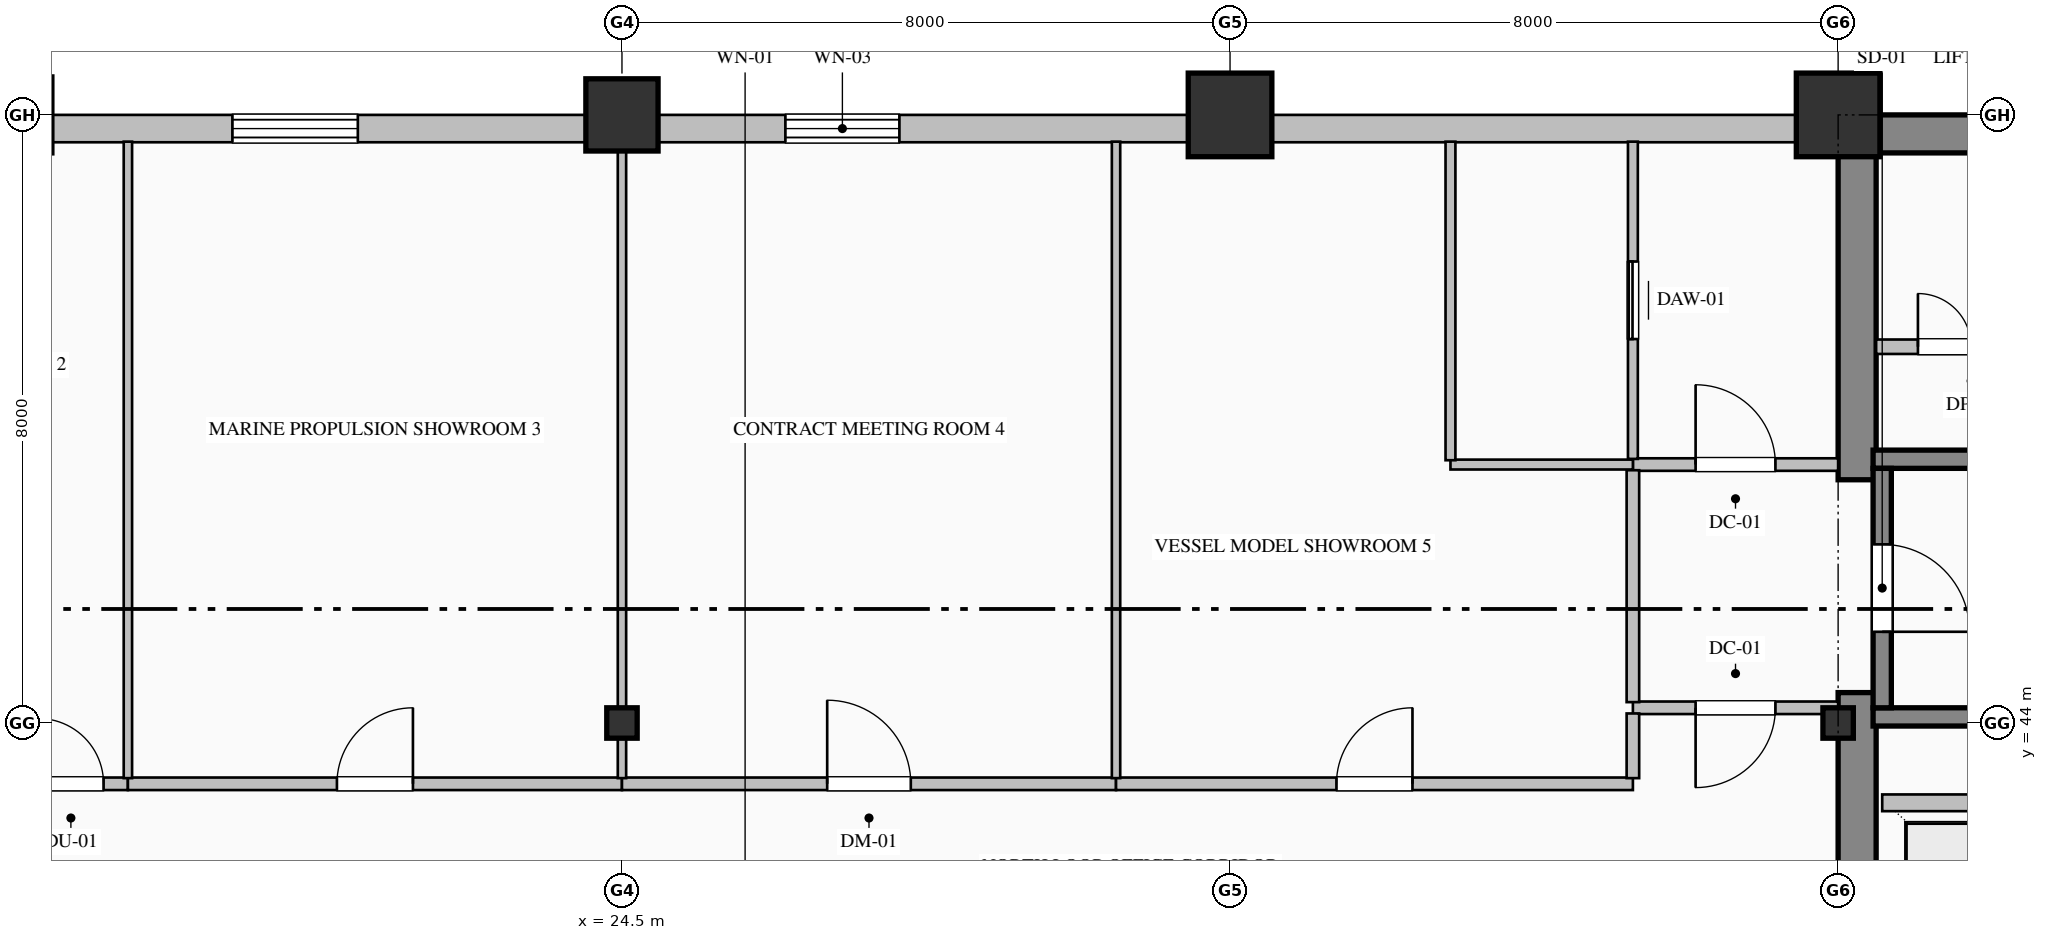
"""IFC4 building model, lengths in metres.
Left out: names, types, materials, properties, quantities, classifications, styles, units other than length and angle.
Written with IfcOpenShell. Run it as: python <this file> out.ifc"""

import sys

from ifc_helpers import new_model, si_unit, direction, frame, frame_2d, origin, origin_2d, place, context, subcontext, project, spatial, rectangle, hollow_rectangle, i_section, extrude, element, fill, save


model = new_model("IFC4")
c1 = context("Model", 3, precision=1e-05, world=origin(), true_north=direction((0.0, 1.0)))
c2 = subcontext(c1, "Body", "Model", "MODEL_VIEW")
j1 = project(units=[si_unit("LENGTHUNIT", "METRE"), si_unit("PLANEANGLEUNIT", "RADIAN")], contexts=[c1])
p1 = place(None, origin())
s1 = spatial("IfcSite", under=j1, at=p1, CompositionType="ELEMENT")
p2 = place(p1, origin())
s2 = spatial("IfcBuilding", under=s1, at=p2, CompositionType="ELEMENT")
p3 = place(p2, frame((0.0, 0.0, 179.0)))
s3 = spatial("IfcBuildingStorey", under=s2, at=p3, CompositionType="ELEMENT", Elevation=179.0)
p4 = place(p3, frame((40.5, 51.75, 0.0), z_axis=(0.0, 0.0, 1.0), x_axis=(1.0, 0.0, 0.0)))
e1 = element("IfcWall", 1, at=p4, inside=s3, PredefinedType="SHEAR", context=c2, shape_type="SweptSolid", body=[
    extrude(rectangle(XDim=23.5, YDim=0.5, at=frame_2d((11.75, 0.0))), origin(), (0.0, 0.0, 1.0), 3.765),
])
p5 = place(p3, frame((40.75, 36.5, 0.0), z_axis=(0.0, 0.0, 1.0), x_axis=(0.0, 1.0, 0.0)))
e2 = element("IfcWall", 2, at=p5, inside=s3, PredefinedType="SHEAR", context=c2, shape_type="SweptSolid", body=[
    extrude(rectangle(XDim=7.9, YDim=0.5, at=frame_2d((3.95, 0.0))), origin(), (0.0, 0.0, 1.0), 3.765),
])
p6 = place(p3, frame((40.75, 47.2, 0.0), z_axis=(0.0, 0.0, 1.0), x_axis=(0.0, 1.0, 0.0)))
e3 = element("IfcWall", 3, at=p6, inside=s3, PredefinedType="SHEAR", context=c2, shape_type="SweptSolid", body=[
    extrude(rectangle(XDim=4.3, YDim=0.5, at=frame_2d((2.15, 0.0))), origin(), (0.0, 0.0, 1.0), 3.765),
])
p7 = place(p3, frame((24.5, 44.0, 0.0), z_axis=(0.0, 0.0, 1.0), x_axis=(1.0, 0.0, 0.0)))
e4 = element("IfcColumn", 4, at=p7, inside=s3, PredefinedType="COLUMN", context=c2, shape_type="SweptSolid", body=[
    extrude(i_section(OverallWidth=0.4, OverallDepth=0.4, WebThickness=0.013, FlangeThickness=0.021, FilletRadius=0.022, at=origin_2d()), origin(), (0.0, 0.0, 1.0), 4.0),
])
p8 = place(p3, frame((24.5, 52.0, 0.0), z_axis=(0.0, 0.0, 1.0), x_axis=(1.0, 0.0, 0.0)))
e5 = element("IfcColumn", 5, at=p8, inside=s3, PredefinedType="COLUMN", context=c2, shape_type="SweptSolid", body=[
    extrude(hollow_rectangle(XDim=0.95, YDim=0.95, WallThickness=0.036, at=origin_2d()), origin(), (0.0, 0.0, 1.0), 4.0),
])
p9 = place(p3, frame((32.5, 52.0, 0.0), z_axis=(0.0, 0.0, 1.0), x_axis=(1.0, 0.0, 0.0)))
e6 = element("IfcColumn", 6, at=p9, inside=s3, PredefinedType="COLUMN", context=c2, shape_type="SweptSolid", body=[
    extrude(hollow_rectangle(XDim=1.1, YDim=1.1, WallThickness=0.04, at=origin_2d()), origin(), (0.0, 0.0, 1.0), 4.0),
])
p10 = place(p3, frame((40.5, 44.0, 0.0), z_axis=(0.0, 0.0, 1.0), x_axis=(1.0, 0.0, 0.0)))
e7 = element("IfcColumn", 7, at=p10, inside=s3, PredefinedType="COLUMN", context=c2, shape_type="SweptSolid", body=[
    extrude(i_section(OverallWidth=0.4, OverallDepth=0.4, WebThickness=0.013, FlangeThickness=0.021, FilletRadius=0.022, at=origin_2d()), origin(), (0.0, 0.0, 1.0), 4.0),
])
p11 = place(p3, frame((40.5, 52.0, 0.0), z_axis=(0.0, 0.0, 1.0), x_axis=(1.0, 0.0, 0.0)))
e8 = element("IfcColumn", 8, at=p11, inside=s3, PredefinedType="COLUMN", context=c2, shape_type="SweptSolid", body=[
    extrude(hollow_rectangle(XDim=1.1, YDim=1.1, WallThickness=0.04, at=origin_2d()), origin(), (0.0, 0.0, 1.0), 4.0),
])
p12 = place(p3, frame((13.0, 51.82, 0.0), z_axis=(0.0, 0.0, 1.0), x_axis=(1.0, 0.0, 0.0)))
e9 = element("IfcWall", 9, at=p12, inside=s3, PredefinedType="SOLIDWALL", context=c2, shape_type="SweptSolid", body=[
    extrude(rectangle(XDim=27.52, YDim=0.36, at=frame_2d((13.76, 0.0))), origin(), (0.0, 0.0, 1.0), 3.265),
])
p13 = place(p12, frame((6.375, 0.0, 0.85)))
e10 = element("IfcOpeningElement", 10, at=p13, cuts=e9, PredefinedType="OPENING", context=c2, shape_type="SweptSolid", body=[
    extrude(rectangle(XDim=1.65, YDim=1.95, at=frame_2d((0.825, 0.975))), frame((0.0, 0.19, 0.0), z_axis=(0.0, -1.0, 0.0), x_axis=(1.0, 0.0, 0.0)), (0.0, 0.0, 1.0), 0.38),
])
p14 = place(p12, frame((13.65, 0.0, 0.85)))
e11 = element("IfcOpeningElement", 11, at=p14, cuts=e9, PredefinedType="OPENING", context=c2, shape_type="SweptSolid", body=[
    extrude(rectangle(XDim=1.5, YDim=1.95, at=frame_2d((0.75, 0.975))), frame((0.0, 0.19, 0.0), z_axis=(0.0, -1.0, 0.0), x_axis=(1.0, 0.0, 0.0)), (0.0, 0.0, 1.0), 0.38),
])
for number, where, z_axis, x_axis in (
    (12, (40.96, 47.47, 0.0), (0.0, 0.0, 1.0), (1.0, 0.0, 0.0)),
    (13, (49.04, 44.08, 0.0), (0.0, 0.0, 1.0), (-1.0, 0.0, 0.0)),
):
    element("IfcWall", number, at=place(p3, frame(where, z_axis=z_axis, x_axis=x_axis)), inside=s3, PredefinedType="SOLIDWALL", context=c2, shape_type="SweptSolid", body=[
        extrude(rectangle(XDim=8.08, YDim=0.24, at=frame_2d((4.04, 0.0))), origin(), (0.0, 0.0, 1.0), 4.0),
    ])
p15 = place(p3, frame((41.08, 47.35, 0.0), z_axis=(0.0, 0.0, 1.0), x_axis=(0.0, -1.0, 0.0)))
e14 = element("IfcWall", 14, at=p15, inside=s3, PredefinedType="SOLIDWALL", context=c2, shape_type="SweptSolid", body=[
    extrude(rectangle(XDim=3.15, YDim=0.24, at=frame_2d((1.575, 0.0))), origin(), (0.0, 0.0, 1.0), 4.0),
])
p16 = place(p15, frame((1.0, 0.0, 0.0)))
e15 = element("IfcOpeningElement", 15, at=p16, cuts=e14, PredefinedType="OPENING", context=c2, shape_type="SweptSolid", body=[
    extrude(rectangle(XDim=1.15, YDim=2.2, at=frame_2d((0.575, 1.1))), frame((0.0, 0.13, 0.0), z_axis=(0.0, -1.0, 0.0), x_axis=(1.0, 0.0, 0.0)), (0.0, 0.0, 1.0), 0.26),
])
p17 = place(p3, frame((41.08, 42.95, 0.0), z_axis=(0.0, 0.0, 1.0), x_axis=(1.0, 0.0, 0.0)))
e16 = element("IfcWall", 16, at=p17, inside=s3, PredefinedType="PARTITIONING", context=c2, shape_type="SweptSolid", body=[
    extrude(rectangle(XDim=8.24, YDim=0.22, at=frame_2d((4.12, 0.0))), origin(), (0.0, 0.0, 1.0), 3.765),
])
p18 = place(p3, frame((37.8, 47.4, 0.0), z_axis=(0.0, 0.0, 1.0), x_axis=(1.0, 0.0, 0.0)))
e17 = element("IfcWall", 17, at=p18, inside=s3, PredefinedType="PARTITIONING", context=c2, shape_type="SweptSolid", body=[
    extrude(rectangle(XDim=2.7, YDim=0.165, at=frame_2d((1.35, 0.0))), origin(), (0.0, 0.0, 1.0), 3.765),
])
p19 = place(p18, frame((0.825, 0.0, 0.0)))
e18 = element("IfcOpeningElement", 18, at=p19, cuts=e17, PredefinedType="OPENING", context=c2, shape_type="SweptSolid", body=[
    extrude(rectangle(XDim=1.05, YDim=2.15, at=frame_2d((0.525, 1.075))), frame((0.0, 0.093, 0.0), z_axis=(0.0, -1.0, 0.0), x_axis=(1.0, 0.0, 0.0)), (0.0, 0.0, 1.0), 0.185),
])
p20 = place(p3, frame((40.5, 44.2, 0.0), z_axis=(0.0, 0.0, 1.0), x_axis=(-1.0, 0.0, 0.0)))
e19 = element("IfcWall", 19, at=p20, inside=s3, PredefinedType="PARTITIONING", context=c2, shape_type="SweptSolid", body=[
    extrude(rectangle(XDim=2.7, YDim=0.165, at=frame_2d((1.35, 0.0))), origin(), (0.0, 0.0, 1.0), 3.765),
])
p21 = place(p20, frame((0.825, 0.0, 0.0)))
e20 = element("IfcOpeningElement", 20, at=p21, cuts=e19, PredefinedType="OPENING", context=c2, shape_type="SweptSolid", body=[
    extrude(rectangle(XDim=1.05, YDim=2.15, at=frame_2d((0.525, 1.075))), frame((0.0, 0.093, 0.0), z_axis=(0.0, -1.0, 0.0), x_axis=(1.0, 0.0, 0.0)), (0.0, 0.0, 1.0), 0.185),
])
p22 = place(p3, frame((37.8, 44.274, 0.0), z_axis=(0.0, 0.0, 1.0), x_axis=(0.0, 1.0, 0.0)))
e21 = element("IfcWall", 21, at=p22, inside=s3, PredefinedType="PARTITIONING", context=c2, shape_type="SweptSolid", body=[
    extrude(rectangle(XDim=3.051, YDim=0.165, at=frame_2d((1.525, 0.0))), origin(), (0.0, 0.0, 1.0), 3.765),
])
p23 = place(p3, frame((37.8, 47.475, 0.0), z_axis=(0.0, 0.0, 1.0), x_axis=(0.0, 1.0, 0.0)))
e22 = element("IfcWall", 22, at=p23, inside=s3, PredefinedType="PARTITIONING", context=c2, shape_type="SweptSolid", body=[
    extrude(rectangle(XDim=4.173, YDim=0.13, at=frame_2d((2.087, 0.0))), origin(), (0.0, 0.0, 1.0), 3.765),
])
p24 = place(p23, frame((1.577, 0.0, 0.0)))
e23 = element("IfcOpeningElement", 23, at=p24, cuts=e22, PredefinedType="OPENING", context=c2, shape_type="SweptSolid", body=[
    extrude(rectangle(XDim=1.02, YDim=2.15, at=frame_2d((0.51, 1.075))), frame((0.0, 0.075, 0.0), z_axis=(0.0, -1.0, 0.0), x_axis=(1.0, 0.0, 0.0)), (0.0, 0.0, 1.0), 0.15),
])
p25 = place(p3, frame((37.8, 47.4, 0.0), z_axis=(0.0, 0.0, 1.0), x_axis=(-1.0, 0.0, 0.0)))
e24 = element("IfcWall", 24, at=p25, inside=s3, PredefinedType="PARTITIONING", context=c2, shape_type="SweptSolid", body=[
    extrude(rectangle(XDim=2.4, YDim=0.13, at=frame_2d((1.2, 0.0))), origin(), (0.0, 0.0, 1.0), 3.765),
])
p26 = place(p3, frame((35.4, 47.457, 0.0), z_axis=(0.0, 0.0, 1.0), x_axis=(0.0, 1.0, 0.0)))
e25 = element("IfcWall", 25, at=p26, inside=s3, PredefinedType="PARTITIONING", context=c2, shape_type="SweptSolid", body=[
    extrude(rectangle(XDim=4.191, YDim=0.13, at=frame_2d((2.095, 0.0))), origin(), (0.0, 0.0, 1.0), 3.765),
])
p27 = place(p3, frame((41.0, 48.95, 0.0), z_axis=(0.0, 0.0, 1.0), x_axis=(1.0, 0.0, 0.0)))
e26 = element("IfcWall", 26, at=p27, inside=s3, PredefinedType="PARTITIONING", context=c2, shape_type="SweptSolid", body=[
    extrude(rectangle(XDim=2.5, YDim=0.19, at=frame_2d((1.25, 0.0))), origin(), (0.0, 0.0, 1.0), 3.765),
])
p28 = place(p27, frame((0.55, 0.0, 0.0)))
e27 = element("IfcOpeningElement", 27, at=p28, cuts=e26, PredefinedType="OPENING", context=c2, shape_type="SweptSolid", body=[
    extrude(rectangle(XDim=1.4, YDim=2.25, at=frame_2d((0.7, 1.125))), frame((0.0, 0.105, 0.0), z_axis=(0.0, -1.0, 0.0), x_axis=(1.0, 0.0, 0.0)), (0.0, 0.0, 1.0), 0.21),
])
p29 = place(p3, frame((16.5, 43.2, 0.0), z_axis=(0.0, 0.0, 1.0), x_axis=(1.0, 0.0, 0.0)))
e28 = element("IfcWall", 28, at=p29, inside=s3, PredefinedType="PARTITIONING", context=c2, shape_type="SweptSolid", body=[
    extrude(rectangle(XDim=1.5, YDim=0.165, at=frame_2d((0.75, 0.0))), origin(), (0.0, 0.0, 1.0), 3.765),
])
p30 = place(p29, frame((0.32, 0.0, 0.0)))
e29 = element("IfcOpeningElement", 29, at=p30, cuts=e28, PredefinedType="OPENING", context=c2, shape_type="SweptSolid", body=[
    extrude(rectangle(XDim=0.86, YDim=2.1, at=frame_2d((0.43, 1.05))), frame((0.0, 0.093, 0.0), z_axis=(0.0, -1.0, 0.0), x_axis=(1.0, 0.0, 0.0)), (0.0, 0.0, 1.0), 0.185),
])
p31 = place(p3, frame((18.0, 43.2, 0.0), z_axis=(0.0, 0.0, 1.0), x_axis=(1.0, 0.0, 0.0)))
e30 = element("IfcWall", 30, at=p31, inside=s3, PredefinedType="PARTITIONING", context=c2, shape_type="SweptSolid", body=[
    extrude(rectangle(XDim=6.5, YDim=0.165, at=frame_2d((3.25, 0.0))), origin(), (0.0, 0.0, 1.0), 3.765),
])
p32 = place(p31, frame((2.75, 0.0, 0.0)))
e31 = element("IfcOpeningElement", 31, at=p32, cuts=e30, PredefinedType="OPENING", context=c2, shape_type="SweptSolid", body=[
    extrude(rectangle(XDim=1.0, YDim=2.15, at=frame_2d((0.5, 1.075))), frame((0.0, 0.093, 0.0), z_axis=(0.0, -1.0, 0.0), x_axis=(1.0, 0.0, 0.0)), (0.0, 0.0, 1.0), 0.185),
])
p33 = place(p3, frame((24.5, 43.2, 0.0), z_axis=(0.0, 0.0, 1.0), x_axis=(1.0, 0.0, 0.0)))
e32 = element("IfcWall", 32, at=p33, inside=s3, PredefinedType="PARTITIONING", context=c2, shape_type="SweptSolid", body=[
    extrude(rectangle(XDim=6.5, YDim=0.165, at=frame_2d((3.25, 0.0))), origin(), (0.0, 0.0, 1.0), 3.765),
])
p34 = place(p33, frame((2.7, 0.0, 0.0)))
e33 = element("IfcOpeningElement", 33, at=p34, cuts=e32, PredefinedType="OPENING", context=c2, shape_type="SweptSolid", body=[
    extrude(rectangle(XDim=1.1, YDim=2.2, at=frame_2d((0.55, 1.1))), frame((0.0, 0.093, 0.0), z_axis=(0.0, -1.0, 0.0), x_axis=(1.0, 0.0, 0.0)), (0.0, 0.0, 1.0), 0.185),
])
p35 = place(p3, frame((31.0, 43.2, 0.0), z_axis=(0.0, 0.0, 1.0), x_axis=(1.0, 0.0, 0.0)))
e34 = element("IfcWall", 34, at=p35, inside=s3, PredefinedType="PARTITIONING", context=c2, shape_type="SweptSolid", body=[
    extrude(rectangle(XDim=6.8, YDim=0.165, at=frame_2d((3.4, 0.0))), origin(), (0.0, 0.0, 1.0), 3.765),
])
p36 = place(p35, frame((2.9, 0.0, 0.0)))
e35 = element("IfcOpeningElement", 35, at=p36, cuts=e34, PredefinedType="OPENING", context=c2, shape_type="SweptSolid", body=[
    extrude(rectangle(XDim=1.0, YDim=2.15, at=frame_2d((0.5, 1.075))), frame((0.0, 0.093, 0.0), z_axis=(0.0, -1.0, 0.0), x_axis=(1.0, 0.0, 0.0)), (0.0, 0.0, 1.0), 0.185),
])
p37 = place(p3, frame((37.8, 43.274, 0.0), z_axis=(0.0, 0.0, 1.0), x_axis=(0.0, 1.0, 0.0)))
e36 = element("IfcWall", 36, at=p37, inside=s3, PredefinedType="PARTITIONING", context=c2, shape_type="SweptSolid", body=[
    extrude(rectangle(XDim=0.851, YDim=0.165, at=frame_2d((0.426, 0.0))), origin(), (0.0, 0.0, 1.0), 3.765),
])
p38 = place(p3, frame((18.0, 51.648, 0.0), z_axis=(0.0, 0.0, 1.0), x_axis=(0.0, -1.0, 0.0)))
e37 = element("IfcWall", 37, at=p38, inside=s3, PredefinedType="MOVABLE", context=c2, shape_type="SweptSolid", body=[
    extrude(rectangle(XDim=8.374, YDim=0.11, at=frame_2d((4.187, 0.0))), origin(), (0.0, 0.0, 1.0), 3.765),
])
p39 = place(p3, frame((24.5, 51.648, 0.0), z_axis=(0.0, 0.0, 1.0), x_axis=(0.0, -1.0, 0.0)))
e38 = element("IfcWall", 38, at=p39, inside=s3, PredefinedType="MOVABLE", context=c2, shape_type="SweptSolid", body=[
    extrude(rectangle(XDim=8.374, YDim=0.11, at=frame_2d((4.187, 0.0))), origin(), (0.0, 0.0, 1.0), 3.157),
])
p40 = place(p3, frame((31.0, 51.648, 0.0), z_axis=(0.0, 0.0, 1.0), x_axis=(0.0, -1.0, 0.0)))
e39 = element("IfcWall", 39, at=p40, inside=s3, PredefinedType="MOVABLE", context=c2, shape_type="SweptSolid", body=[
    extrude(rectangle(XDim=8.374, YDim=0.11, at=frame_2d((4.187, 0.0))), origin(), (0.0, 0.0, 1.0), 3.765),
])
p41 = place(p13, origin())
e40 = element("IfcWindow", 40, at=p41, inside=s3, PartitioningType="DOUBLE_PANEL_VERTICAL", PredefinedType="WINDOW", context=c2, shape_type="SweptSolid", body=[
    extrude(rectangle(XDim=1.65, YDim=1.95, at=frame_2d((0.825, 0.975))), frame((0.0, 0.15, 0.0), z_axis=(0.0, -1.0, 0.0), x_axis=(1.0, 0.0, 0.0)), (0.0, 0.0, 1.0), 0.06),
])
fill(e10, e40)
p42 = place(p14, origin())
e41 = element("IfcWindow", 41, at=p42, inside=s3, PartitioningType="DOUBLE_PANEL_VERTICAL", PredefinedType="WINDOW", context=c2, shape_type="SweptSolid", body=[
    extrude(rectangle(XDim=1.5, YDim=1.95, at=frame_2d((0.75, 0.975))), frame((0.0, 0.15, 0.0), z_axis=(0.0, -1.0, 0.0), x_axis=(1.0, 0.0, 0.0)), (0.0, 0.0, 1.0), 0.06),
])
fill(e11, e41)
p43 = place(p16, origin())
e42 = element("IfcDoor", 42, at=p43, inside=s3, OperationType="SINGLE_SWING_RIGHT", PredefinedType="DOOR", context=c2, shape_type="SweptSolid", body=[
    extrude(rectangle(XDim=1.15, YDim=2.2, at=frame_2d((0.575, 1.1))), frame((0.0, 0.025, 0.0), z_axis=(0.0, -1.0, 0.0), x_axis=(1.0, 0.0, 0.0)), (0.0, 0.0, 1.0), 0.05),
])
fill(e15, e42)
p44 = place(p19, origin())
e43 = element("IfcDoor", 43, at=p44, inside=s3, OperationType="SINGLE_SWING_LEFT", PredefinedType="DOOR", context=c2, shape_type="SweptSolid", body=[
    extrude(rectangle(XDim=1.05, YDim=2.15, at=frame_2d((0.525, 1.075))), frame((0.0, 0.025, 0.0), z_axis=(0.0, -1.0, 0.0), x_axis=(1.0, 0.0, 0.0)), (0.0, 0.0, 1.0), 0.05),
])
fill(e18, e43)
p45 = place(p21, origin())
e44 = element("IfcDoor", 44, at=p45, inside=s3, OperationType="SINGLE_SWING_RIGHT", PredefinedType="DOOR", context=c2, shape_type="SweptSolid", body=[
    extrude(rectangle(XDim=1.05, YDim=2.15, at=frame_2d((0.525, 1.075))), frame((0.0, 0.025, 0.0), z_axis=(0.0, -1.0, 0.0), x_axis=(1.0, 0.0, 0.0)), (0.0, 0.0, 1.0), 0.05),
])
fill(e20, e44)
p46 = place(p24, origin())
e45 = element("IfcDoor", 45, at=p46, inside=s3, OperationType="SLIDING_TO_LEFT", PredefinedType="DOOR", context=c2, shape_type="SweptSolid", body=[
    extrude(rectangle(XDim=1.02, YDim=2.15, at=frame_2d((0.51, 1.075))), frame((0.0, 0.025, 0.0), z_axis=(0.0, -1.0, 0.0), x_axis=(1.0, 0.0, 0.0)), (0.0, 0.0, 1.0), 0.05),
])
fill(e23, e45)
p47 = place(p28, origin())
e46 = element("IfcDoor", 46, at=p47, inside=s3, OperationType="DOUBLE_DOOR_SINGLE_SWING", PredefinedType="DOOR", context=c2, shape_type="SweptSolid", body=[
    extrude(rectangle(XDim=1.4, YDim=2.25, at=frame_2d((0.7, 1.125))), frame((0.0, 0.025, 0.0), z_axis=(0.0, -1.0, 0.0), x_axis=(1.0, 0.0, 0.0)), (0.0, 0.0, 1.0), 0.05),
])
fill(e27, e46)
p48 = place(p30, origin())
e47 = element("IfcDoor", 47, at=p48, inside=s3, OperationType="SINGLE_SWING_LEFT", PredefinedType="DOOR", context=c2, shape_type="SweptSolid", body=[
    extrude(rectangle(XDim=0.86, YDim=2.1, at=frame_2d((0.43, 1.05))), frame((0.0, 0.025, 0.0), z_axis=(0.0, -1.0, 0.0), x_axis=(1.0, 0.0, 0.0)), (0.0, 0.0, 1.0), 0.05),
])
fill(e29, e47)
p49 = place(p32, origin())
e48 = element("IfcDoor", 48, at=p49, inside=s3, OperationType="SINGLE_SWING_RIGHT", PredefinedType="DOOR", context=c2, shape_type="SweptSolid", body=[
    extrude(rectangle(XDim=1.0, YDim=2.15, at=frame_2d((0.5, 1.075))), frame((0.0, 0.025, 0.0), z_axis=(0.0, -1.0, 0.0), x_axis=(1.0, 0.0, 0.0)), (0.0, 0.0, 1.0), 0.05),
])
fill(e31, e48)
p50 = place(p34, origin())
e49 = element("IfcDoor", 49, at=p50, inside=s3, OperationType="SINGLE_SWING_LEFT", PredefinedType="DOOR", context=c2, shape_type="SweptSolid", body=[
    extrude(rectangle(XDim=1.1, YDim=2.2, at=frame_2d((0.55, 1.1))), frame((0.0, 0.025, 0.0), z_axis=(0.0, -1.0, 0.0), x_axis=(1.0, 0.0, 0.0)), (0.0, 0.0, 1.0), 0.05),
])
fill(e33, e49)
p51 = place(p36, origin())
e50 = element("IfcDoor", 50, at=p51, inside=s3, OperationType="SINGLE_SWING_RIGHT", PredefinedType="DOOR", context=c2, shape_type="SweptSolid", body=[
    extrude(rectangle(XDim=1.0, YDim=2.15, at=frame_2d((0.5, 1.075))), frame((0.0, 0.025, 0.0), z_axis=(0.0, -1.0, 0.0), x_axis=(1.0, 0.0, 0.0)), (0.0, 0.0, 1.0), 0.05),
])
fill(e35, e50)
save(model, sys.argv[1])
